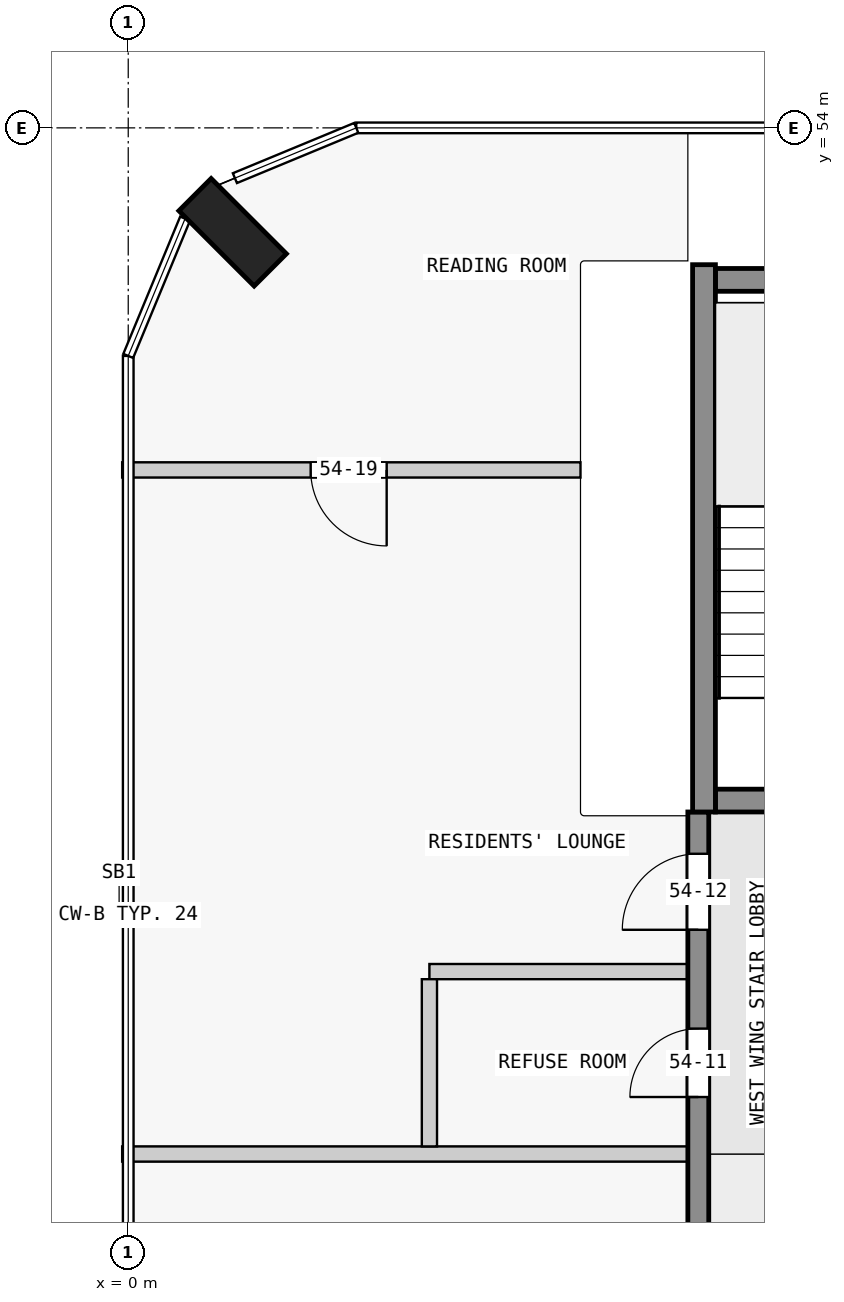
"""IFC4 building model, lengths in metres.
Left out: names, types, materials, properties, quantities, classifications, styles, units other than length and angle.
Written with IfcOpenShell. Run it as: python <this file> out.ifc"""

import sys

from ifc_helpers import new_model, si_unit, direction, frame, frame_2d, origin, origin_2d, place, context, subcontext, project, spatial, rectangle, extrude, element, fill, save


model = new_model("IFC4")
c1 = context("Model", 3, precision=1e-05, world=origin(), true_north=direction((0.0, 1.0)))
c2 = subcontext(c1, "Body", "Model", "MODEL_VIEW")
j1 = project(units=[si_unit("LENGTHUNIT", "METRE"), si_unit("PLANEANGLEUNIT", "RADIAN")], contexts=[c1])
p1 = place(None, origin())
s1 = spatial("IfcSite", under=j1, at=p1, CompositionType="ELEMENT")
p2 = place(p1, origin())
s2 = spatial("IfcBuilding", under=s1, at=p2, CompositionType="ELEMENT")
p3 = place(p2, frame((0.0, 0.0, 208.4)))
s3 = spatial("IfcBuildingStorey", under=s2, at=p3, CompositionType="ELEMENT", Elevation=208.4)
p4 = place(p3, frame((1.374, 52.626, 0.0), z_axis=(0.0, 0.0, 1.0), x_axis=(0.707106781187, 0.707106781187, 0.0)))
e1 = element("IfcColumn", 1, at=p4, inside=s3, PredefinedType="COLUMN", context=c2, shape_type="SweptSolid", body=[
    extrude(rectangle(XDim=0.6, YDim=1.4, at=origin_2d()), origin(), (0.0, 0.0, 1.0), 3.5),
])
p5 = place(p3, frame((7.725, 45.15, 0.0), z_axis=(0.0, 0.0, 1.0), x_axis=(1.0, 0.0, 0.0)))
e2 = element("IfcWall", 2, at=p5, inside=s3, PredefinedType="SHEAR", context=c2, shape_type="SweptSolid", body=[
    extrude(rectangle(XDim=2.55, YDim=0.3, at=frame_2d((1.275, 0.0))), origin(), (0.0, 0.0, 1.0), 3.5),
])
p6 = place(p5, frame((0.725, 0.0, 0.0)))
e3 = element("IfcOpeningElement", 3, at=p6, cuts=e2, PredefinedType="OPENING", context=c2, shape_type="SweptSolid", body=[
    extrude(rectangle(XDim=1.1, YDim=2.1, at=frame_2d((0.55, 1.05))), frame((0.0, 0.16, 0.0), z_axis=(0.0, -1.0, 0.0), x_axis=(1.0, 0.0, 0.0)), (0.0, 0.0, 1.0), 0.32),
])
p7 = place(p3, frame((7.725, 52.0, 0.0), z_axis=(0.0, 0.0, 1.0), x_axis=(1.0, 0.0, 0.0)))
e4 = element("IfcWall", 4, at=p7, inside=s3, PredefinedType="SHEAR", context=c2, shape_type="SweptSolid", body=[
    extrude(rectangle(XDim=2.55, YDim=0.3, at=frame_2d((1.275, 0.0))), origin(), (0.0, 0.0, 1.0), 3.5),
])
p8 = place(p3, frame((7.575, 45.0, 0.0), z_axis=(0.0, 0.0, 1.0), x_axis=(0.0, 1.0, 0.0)))
e5 = element("IfcWall", 5, at=p8, inside=s3, PredefinedType="SHEAR", context=c2, shape_type="SweptSolid", body=[
    extrude(rectangle(XDim=7.2, YDim=0.3, at=frame_2d((3.6, 0.0))), origin(), (0.0, 0.0, 1.0), 3.5),
])
p9 = place(p3, frame((7.5, 18.0, 0.0), z_axis=(0.0, 0.0, 1.0), x_axis=(0.0, 1.0, 0.0)))
e6 = element("IfcWall", 6, at=p9, inside=s3, PredefinedType="SHEAR", context=c2, shape_type="SweptSolid", body=[
    extrude(rectangle(XDim=27.0, YDim=0.275, at=frame_2d((13.5, 0.0))), origin(), (0.0, 0.0, 1.0), 3.25),
])
p10 = place(p9, frame((1.75, 0.0, 0.0)))
e7 = element("IfcOpeningElement", 7, at=p10, cuts=e6, PredefinedType="OPENING", context=c2, shape_type="SweptSolid", body=[
    extrude(rectangle(XDim=1.0, YDim=2.1, at=frame_2d((0.5, 1.05))), frame((0.0, 0.147, 0.0), z_axis=(0.0, -1.0, 0.0), x_axis=(1.0, 0.0, 0.0)), (0.0, 0.0, 1.0), 0.295),
])
p11 = place(p9, frame((5.85, 0.0, 0.0)))
e8 = element("IfcOpeningElement", 8, at=p11, cuts=e6, PredefinedType="OPENING", context=c2, shape_type="SweptSolid", body=[
    extrude(rectangle(XDim=1.8, YDim=2.1, at=frame_2d((0.9, 1.05))), frame((0.0, 0.147, 0.0), z_axis=(0.0, -1.0, 0.0), x_axis=(1.0, 0.0, 0.0)), (0.0, 0.0, 1.0), 0.295),
])
p12 = place(p9, frame((13.05, 0.0, 0.0)))
e9 = element("IfcOpeningElement", 9, at=p12, cuts=e6, PredefinedType="OPENING", context=c2, shape_type="SweptSolid", body=[
    extrude(rectangle(XDim=1.0, YDim=2.1, at=frame_2d((0.5, 1.05))), frame((0.0, 0.147, 0.0), z_axis=(0.0, -1.0, 0.0), x_axis=(1.0, 0.0, 0.0)), (0.0, 0.0, 1.0), 0.295),
])
p13 = place(p9, frame((19.75, 0.0, 0.0)))
e10 = element("IfcOpeningElement", 10, at=p13, cuts=e6, PredefinedType="OPENING", context=c2, shape_type="SweptSolid", body=[
    extrude(rectangle(XDim=1.0, YDim=2.1, at=frame_2d((0.5, 1.05))), frame((0.0, 0.147, 0.0), z_axis=(0.0, -1.0, 0.0), x_axis=(1.0, 0.0, 0.0)), (0.0, 0.0, 1.0), 0.295),
])
p14 = place(p9, frame((23.25, 0.0, 0.0)))
e11 = element("IfcOpeningElement", 11, at=p14, cuts=e6, PredefinedType="OPENING", context=c2, shape_type="SweptSolid", body=[
    extrude(rectangle(XDim=0.9, YDim=2.1, at=frame_2d((0.45, 1.05))), frame((0.0, 0.147, 0.0), z_axis=(0.0, -1.0, 0.0), x_axis=(1.0, 0.0, 0.0)), (0.0, 0.0, 1.0), 0.295),
])
p15 = place(p9, frame((25.45, 0.0, 0.0)))
e12 = element("IfcOpeningElement", 12, at=p15, cuts=e6, PredefinedType="OPENING", context=c2, shape_type="SweptSolid", body=[
    extrude(rectangle(XDim=1.0, YDim=2.1, at=frame_2d((0.5, 1.05))), frame((0.0, 0.147, 0.0), z_axis=(0.0, -1.0, 0.0), x_axis=(1.0, 0.0, 0.0)), (0.0, 0.0, 1.0), 0.295),
])
p16 = place(p3, frame((7.363, 40.5, 0.0), z_axis=(0.0, 0.0, 1.0), x_axis=(-1.0, 0.0, 0.0)))
e13 = element("IfcWall", 13, at=p16, inside=s3, PredefinedType="PARTITIONING", context=c2, shape_type="SweptSolid", body=[
    extrude(rectangle(XDim=7.443, YDim=0.2, at=frame_2d((3.721, 0.0))), origin(), (0.0, 0.0, 1.0), 3.25),
])
p17 = place(p3, frame((7.363, 42.9, 0.0), z_axis=(0.0, 0.0, 1.0), x_axis=(-1.0, 0.0, 0.0)))
e14 = element("IfcWall", 14, at=p17, inside=s3, PredefinedType="PARTITIONING", context=c2, shape_type="SweptSolid", body=[
    extrude(rectangle(XDim=3.4, YDim=0.2, at=frame_2d((1.7, 0.0))), origin(), (0.0, 0.0, 1.0), 3.25),
])
p18 = place(p3, frame((5.95, 49.5, 0.0), z_axis=(0.0, 0.0, 1.0), x_axis=(-1.0, 0.0, 0.0)))
e15 = element("IfcWall", 15, at=p18, inside=s3, PredefinedType="PARTITIONING", context=c2, shape_type="SweptSolid", body=[
    extrude(rectangle(XDim=6.03, YDim=0.2, at=frame_2d((3.015, 0.0))), origin(), (0.0, 0.0, 1.0), 3.25),
])
p19 = place(p18, frame((2.55, 0.0, 0.0)))
e16 = element("IfcOpeningElement", 16, at=p19, cuts=e15, PredefinedType="OPENING", context=c2, shape_type="SweptSolid", body=[
    extrude(rectangle(XDim=1.0, YDim=2.1, at=frame_2d((0.5, 1.05))), frame((0.0, 0.11, 0.0), z_axis=(0.0, -1.0, 0.0), x_axis=(1.0, 0.0, 0.0)), (0.0, 0.0, 1.0), 0.22),
])
p20 = place(p3, frame((3.962, 42.8, 0.0), z_axis=(0.0, 0.0, 1.0), x_axis=(0.0, -1.0, 0.0)))
e17 = element("IfcWall", 17, at=p20, inside=s3, PredefinedType="PARTITIONING", context=c2, shape_type="SweptSolid", body=[
    extrude(rectangle(XDim=2.2, YDim=0.2, at=frame_2d((1.1, 0.0))), origin(), (0.0, 0.0, 1.0), 3.25),
])
p21 = place(p14, origin())
e18 = element("IfcDoor", 18, at=p21, inside=s3, OperationType="SINGLE_SWING_RIGHT", PredefinedType="DOOR", context=c2, shape_type="SweptSolid", body=[
    extrude(rectangle(XDim=0.9, YDim=2.1, at=frame_2d((0.45, 1.05))), frame((0.0, 0.025, 0.0), z_axis=(0.0, -1.0, 0.0), x_axis=(1.0, 0.0, 0.0)), (0.0, 0.0, 1.0), 0.05),
])
fill(e11, e18)
p22 = place(p15, origin())
e19 = element("IfcDoor", 19, at=p22, inside=s3, OperationType="SINGLE_SWING_RIGHT", PredefinedType="DOOR", context=c2, shape_type="SweptSolid", body=[
    extrude(rectangle(XDim=1.0, YDim=2.1, at=frame_2d((0.5, 1.05))), frame((0.0, 0.025, 0.0), z_axis=(0.0, -1.0, 0.0), x_axis=(1.0, 0.0, 0.0)), (0.0, 0.0, 1.0), 0.05),
])
fill(e12, e19)
p23 = place(p19, origin())
e20 = element("IfcDoor", 20, at=p23, inside=s3, OperationType="SINGLE_SWING_RIGHT", PredefinedType="DOOR", context=c2, shape_type="SweptSolid", body=[
    extrude(rectangle(XDim=1.0, YDim=2.1, at=frame_2d((0.5, 1.05))), frame((0.0, 0.025, 0.0), z_axis=(0.0, -1.0, 0.0), x_axis=(1.0, 0.0, 0.0)), (0.0, 0.0, 1.0), 0.05),
])
fill(e16, e20)
save(model, sys.argv[1])
